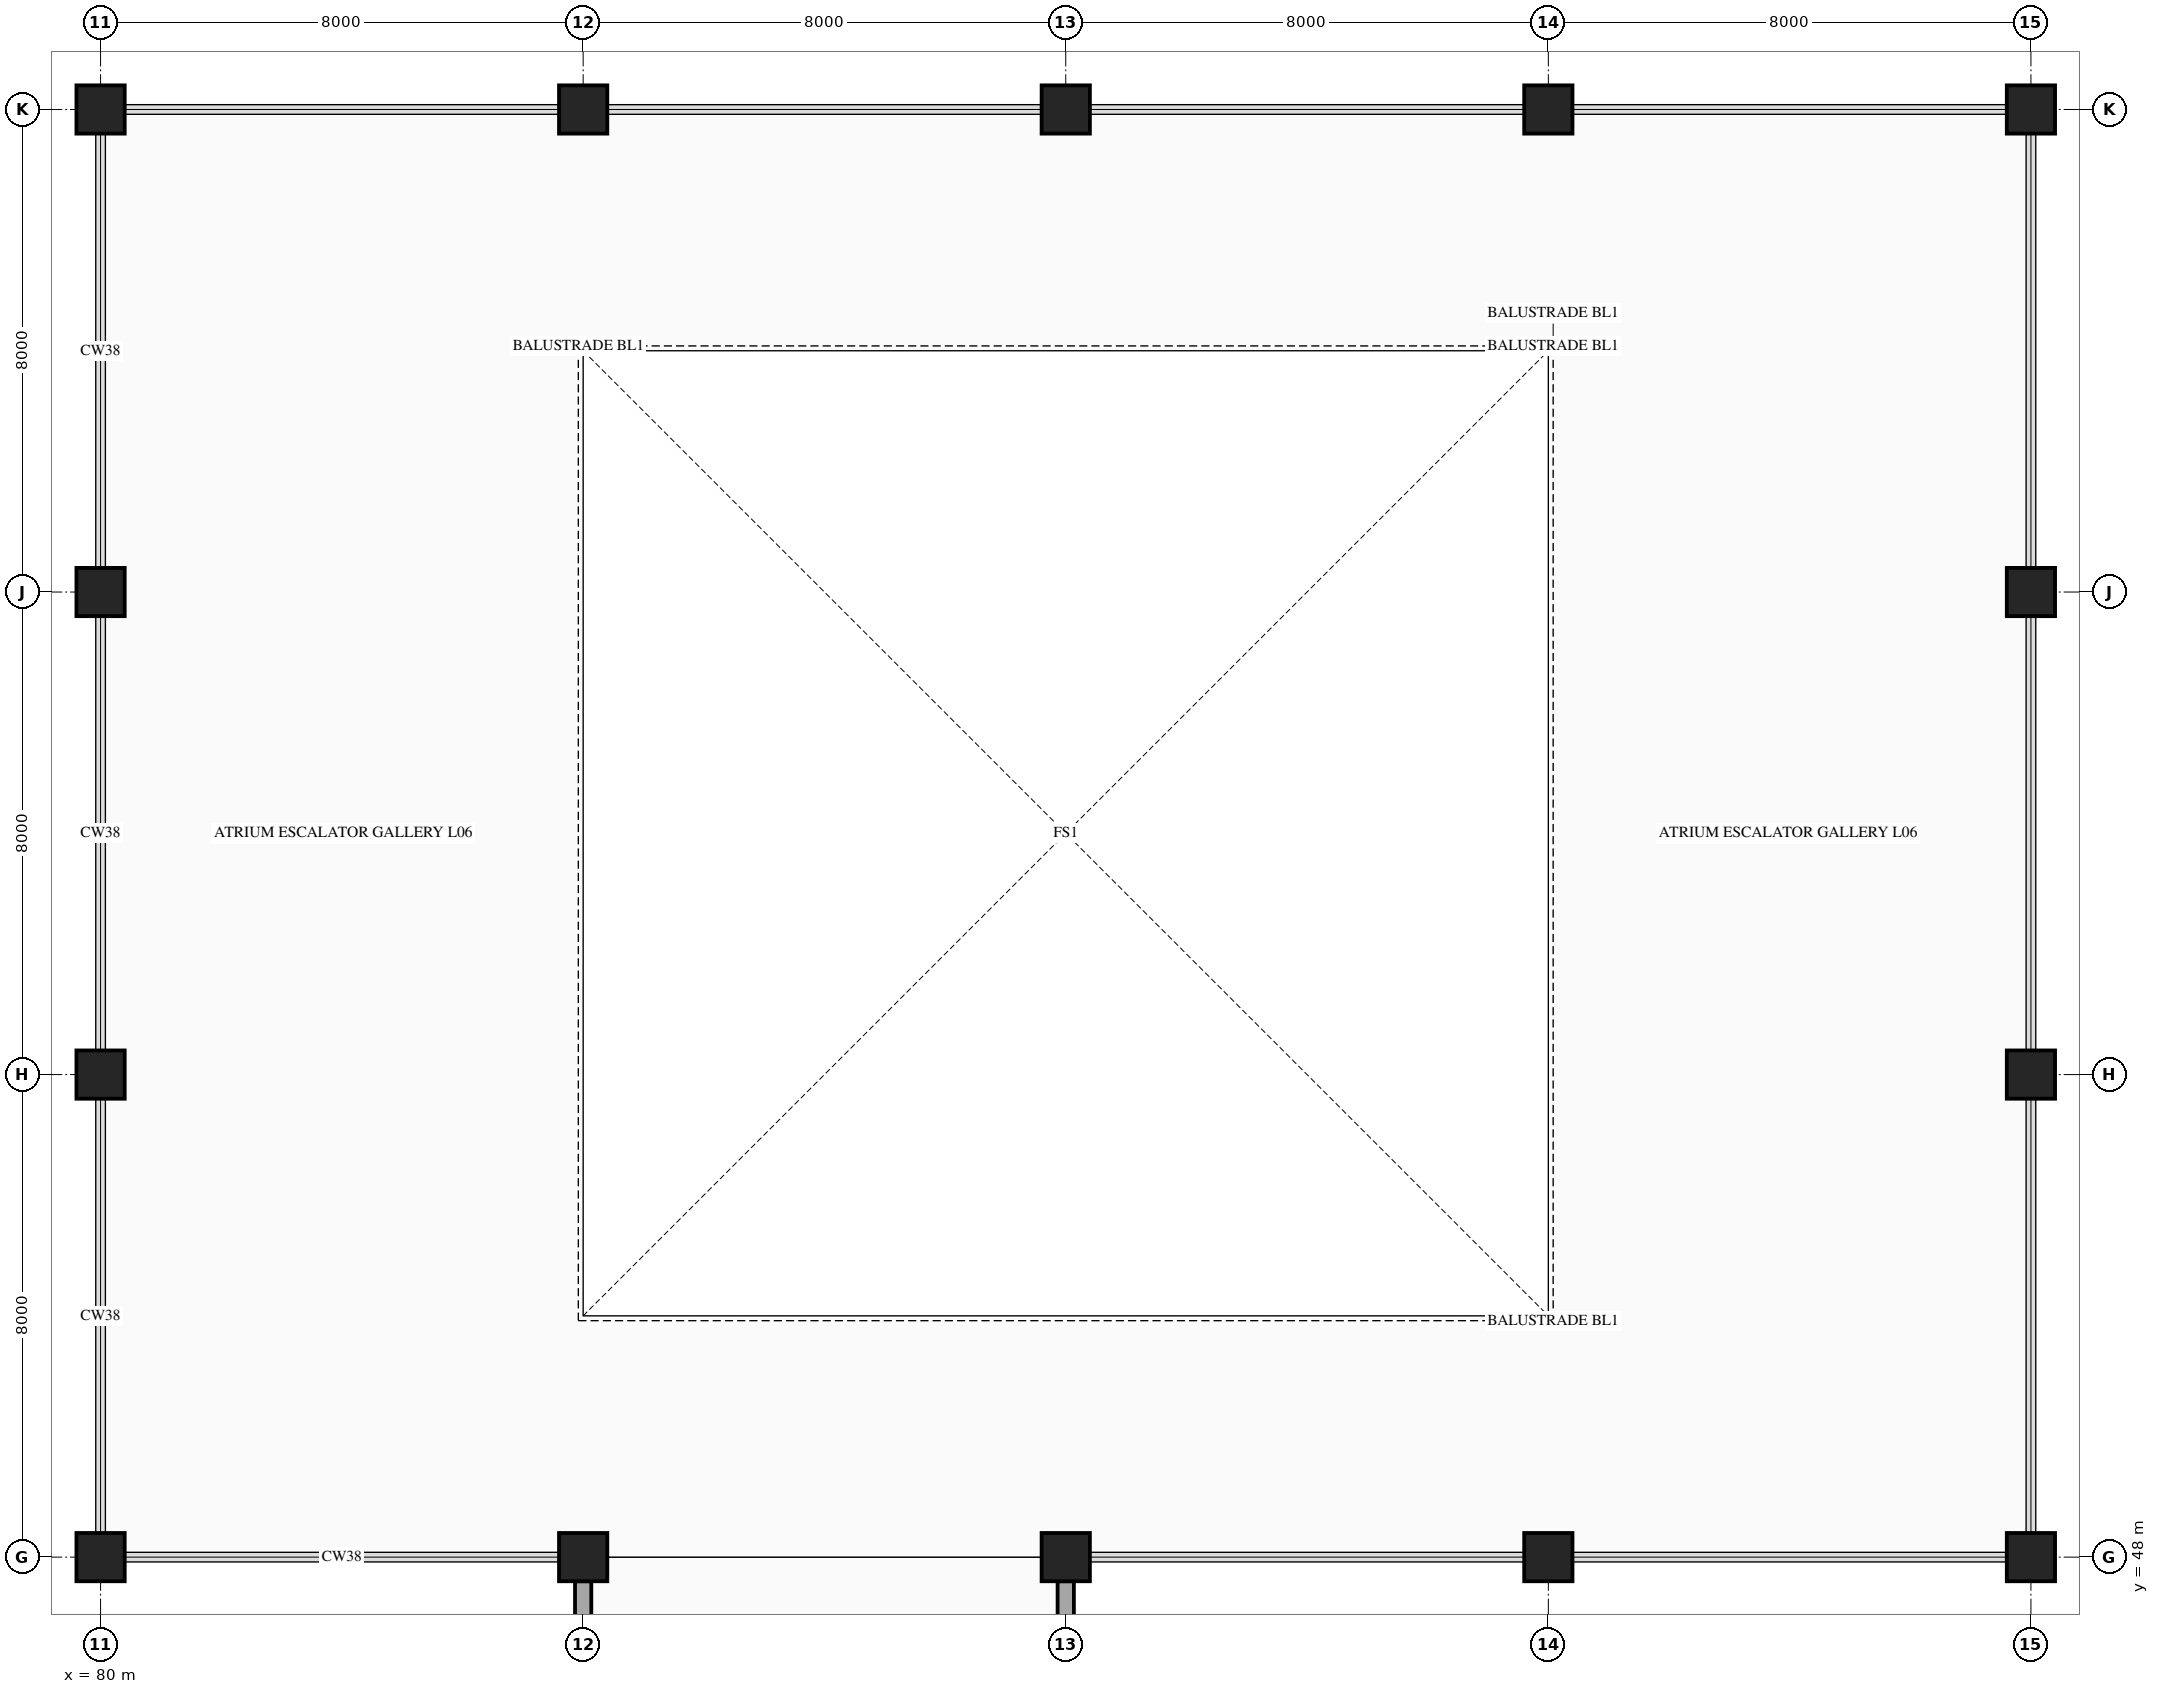
"""IFC4 building model, lengths in metres.
Left out: names, types, materials, properties, quantities, classifications, styles, units other than length and angle.
Written with IfcOpenShell. Run it as: python <this file> out.ifc"""

import sys

from ifc_helpers import new_model, si_unit, direction, frame, frame_2d, origin, origin_2d, place, context, subcontext, project, spatial, rectangle, circle, extrude, element, save


model = new_model("IFC4")
c1 = context("Model", 3, precision=1e-05, world=origin(), true_north=direction((0.0, 1.0)))
c2 = subcontext(c1, "Body", "Model", "MODEL_VIEW")
j1 = project(units=[si_unit("LENGTHUNIT", "METRE"), si_unit("PLANEANGLEUNIT", "RADIAN")], contexts=[c1])
p1 = place(None, origin())
s1 = spatial("IfcSite", under=j1, at=p1, CompositionType="ELEMENT")
p2 = place(p1, origin())
s2 = spatial("IfcBuilding", under=s1, at=p2, CompositionType="ELEMENT")
p3 = place(p2, frame((0.0, 0.0, 28.4)))
s3 = spatial("IfcBuildingStorey", under=s2, at=p3, CompositionType="ELEMENT", Elevation=28.4)
p4 = place(p3, frame((80.0, 48.0, 0.0), z_axis=(0.0, 0.0, 1.0), x_axis=(1.0, 0.0, 0.0)))
e1 = element("IfcColumn", 1, at=p4, inside=s3, PredefinedType="COLUMN", context=c2, shape_type="SweptSolid", body=[
    extrude(circle(Radius=0.4, at=origin_2d()), origin(), (0.0, 0.0, 1.0), 4.5),
])
p5 = place(p3, frame((80.0, 56.0, 0.0), z_axis=(0.0, 0.0, 1.0), x_axis=(1.0, 0.0, 0.0)))
e2 = element("IfcColumn", 2, at=p5, inside=s3, PredefinedType="COLUMN", context=c2, shape_type="SweptSolid", body=[
    extrude(rectangle(XDim=0.8, YDim=0.8, at=origin_2d()), origin(), (0.0, 0.0, 1.0), 4.5),
])
p6 = place(p3, frame((80.0, 64.0, 0.0), z_axis=(0.0, 0.0, 1.0), x_axis=(1.0, 0.0, 0.0)))
e3 = element("IfcColumn", 3, at=p6, inside=s3, PredefinedType="COLUMN", context=c2, shape_type="SweptSolid", body=[
    extrude(circle(Radius=0.4, at=origin_2d()), origin(), (0.0, 0.0, 1.0), 4.5),
])
for number, where, z_axis, x_axis in (
    (4, (80.0, 72.0, 0.0), (0.0, 0.0, 1.0), (1.0, 0.0, 0.0)),
    (5, (88.0, 48.0, 0.0), (0.0, 0.0, 1.0), (1.0, 0.0, 0.0)),
):
    element("IfcColumn", number, at=place(p3, frame(where, z_axis=z_axis, x_axis=x_axis)), inside=s3, PredefinedType="COLUMN", context=c2, shape_type="SweptSolid", body=[
        extrude(rectangle(XDim=0.8, YDim=0.8, at=origin_2d()), origin(), (0.0, 0.0, 1.0), 4.5),
    ])
for number, where, z_axis, x_axis in (
    (6, (88.0, 72.0, 0.0), (0.0, 0.0, 1.0), (1.0, 0.0, 0.0)),
    (7, (96.0, 48.0, 0.0), (0.0, 0.0, 1.0), (1.0, 0.0, 0.0)),
):
    element("IfcColumn", number, at=place(p3, frame(where, z_axis=z_axis, x_axis=x_axis)), inside=s3, PredefinedType="COLUMN", context=c2, shape_type="SweptSolid", body=[
        extrude(circle(Radius=0.4, at=origin_2d()), origin(), (0.0, 0.0, 1.0), 4.5),
    ])
for number, where, z_axis, x_axis in (
    (8, (96.0, 72.0, 0.0), (0.0, 0.0, 1.0), (1.0, 0.0, 0.0)),
    (9, (104.0, 48.0, 0.0), (0.0, 0.0, 1.0), (1.0, 0.0, 0.0)),
):
    element("IfcColumn", number, at=place(p3, frame(where, z_axis=z_axis, x_axis=x_axis)), inside=s3, PredefinedType="COLUMN", context=c2, shape_type="SweptSolid", body=[
        extrude(rectangle(XDim=0.8, YDim=0.8, at=origin_2d()), origin(), (0.0, 0.0, 1.0), 4.5),
    ])
for number, where, z_axis, x_axis in (
    (10, (104.0, 72.0, 0.0), (0.0, 0.0, 1.0), (1.0, 0.0, 0.0)),
    (11, (112.0, 48.0, 0.0), (0.0, 0.0, 1.0), (1.0, 0.0, 0.0)),
):
    element("IfcColumn", number, at=place(p3, frame(where, z_axis=z_axis, x_axis=x_axis)), inside=s3, PredefinedType="COLUMN", context=c2, shape_type="SweptSolid", body=[
        extrude(circle(Radius=0.4, at=origin_2d()), origin(), (0.0, 0.0, 1.0), 4.5),
    ])
p7 = place(p3, frame((112.0, 56.0, 0.0), z_axis=(0.0, 0.0, 1.0), x_axis=(1.0, 0.0, 0.0)))
e12 = element("IfcColumn", 12, at=p7, inside=s3, PredefinedType="COLUMN", context=c2, shape_type="SweptSolid", body=[
    extrude(rectangle(XDim=0.8, YDim=0.8, at=origin_2d()), origin(), (0.0, 0.0, 1.0), 4.5),
])
p8 = place(p3, frame((112.0, 64.0, 0.0), z_axis=(0.0, 0.0, 1.0), x_axis=(1.0, 0.0, 0.0)))
e13 = element("IfcColumn", 13, at=p8, inside=s3, PredefinedType="COLUMN", context=c2, shape_type="SweptSolid", body=[
    extrude(circle(Radius=0.4, at=origin_2d()), origin(), (0.0, 0.0, 1.0), 4.5),
])
p9 = place(p3, frame((112.0, 72.0, 0.0), z_axis=(0.0, 0.0, 1.0), x_axis=(1.0, 0.0, 0.0)))
e14 = element("IfcColumn", 14, at=p9, inside=s3, PredefinedType="COLUMN", context=c2, shape_type="SweptSolid", body=[
    extrude(rectangle(XDim=0.8, YDim=0.8, at=origin_2d()), origin(), (0.0, 0.0, 1.0), 4.5),
])
p10 = place(p3, frame((88.0, 40.375, 0.0), z_axis=(0.0, 0.0, 1.0), x_axis=(0.0, 1.0, 0.0)))
e15 = element("IfcWall", 15, at=p10, inside=s3, PredefinedType="STANDARD", context=c2, shape_type="SweptSolid", body=[
    extrude(rectangle(XDim=7.225, YDim=0.27, at=frame_2d((3.613, 0.0))), origin(), (0.0, 0.0, 1.0), 3.48),
])
p11 = place(p10, frame((2.113, 0.0, 0.8)))
e16 = element("IfcOpeningElement", 16, at=p11, cuts=e15, PredefinedType="OPENING", context=c2, shape_type="SweptSolid", body=[
    extrude(rectangle(XDim=3.0, YDim=1.6, at=frame_2d((1.5, 0.8))), frame((0.0, 0.145, 0.0), z_axis=(0.0, -1.0, 0.0), x_axis=(1.0, 0.0, 0.0)), (0.0, 0.0, 1.0), 0.29),
])
p12 = place(p3, frame((96.0, 47.6, 0.0), z_axis=(0.0, 0.0, 1.0), x_axis=(0.0, -1.0, 0.0)))
e17 = element("IfcWall", 17, at=p12, inside=s3, PredefinedType="STANDARD", context=c2, shape_type="SweptSolid", body=[
    extrude(rectangle(XDim=7.225, YDim=0.27, at=frame_2d((3.613, 0.0))), origin(), (0.0, 0.0, 1.0), 3.48),
])
p13 = place(p12, frame((2.063, 0.0, 0.8)))
e18 = element("IfcOpeningElement", 18, at=p13, cuts=e17, PredefinedType="OPENING", context=c2, shape_type="SweptSolid", body=[
    extrude(rectangle(XDim=3.1, YDim=1.35, at=frame_2d((1.55, 0.675))), frame((0.0, 0.145, 0.0), z_axis=(0.0, -1.0, 0.0), x_axis=(1.0, 0.0, 0.0)), (0.0, 0.0, 1.0), 0.29),
])
save(model, sys.argv[1])
